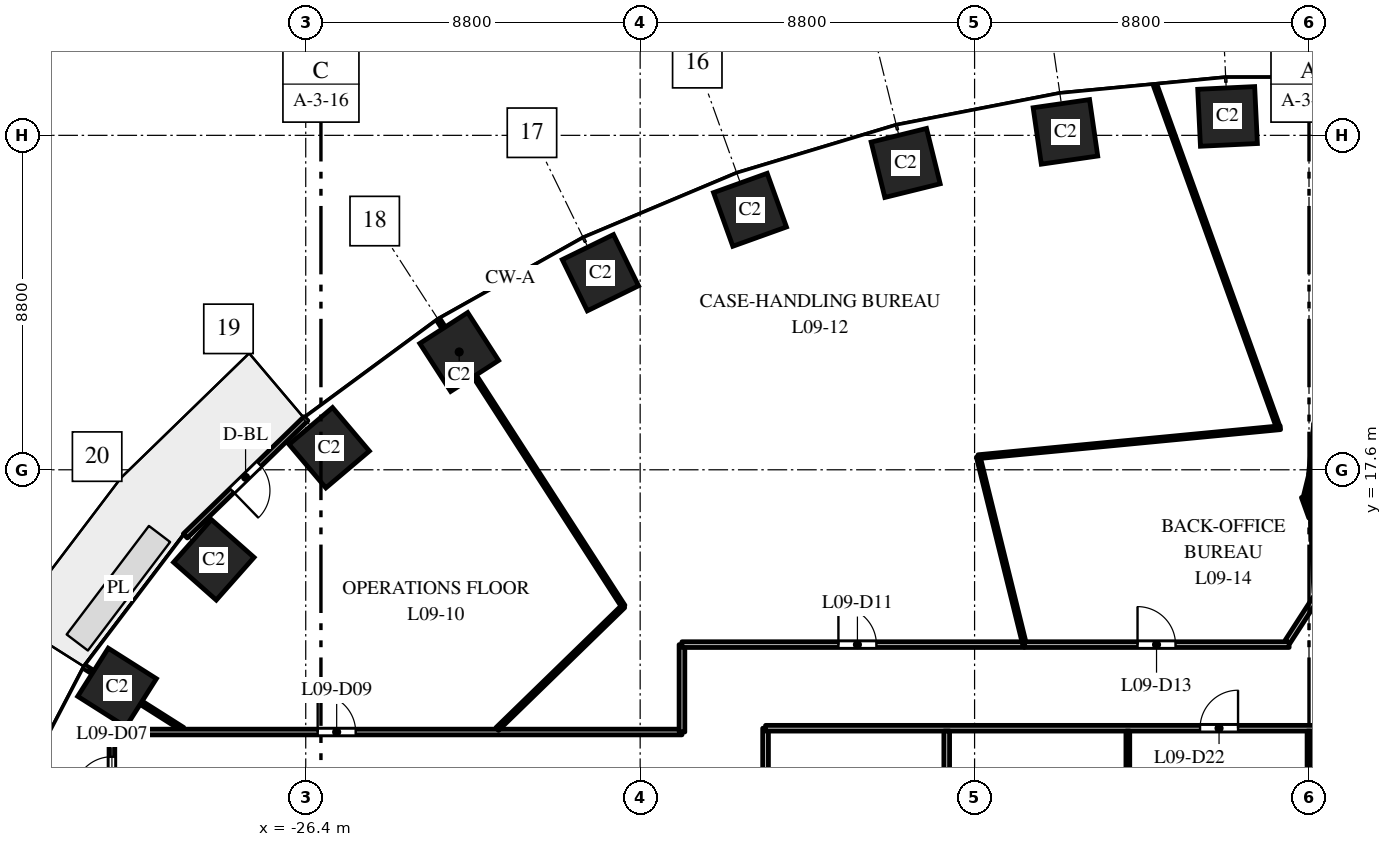
"""IFC4 building model, lengths in metres.
Left out: names, types, materials, properties, quantities, classifications, styles, units other than length and angle.
Written with IfcOpenShell. Run it as: python <this file> out.ifc"""

import sys

from ifc_helpers import new_model, si_unit, direction, frame, frame_2d, origin, origin_2d, place, context, subcontext, project, spatial, rectangle, extrude, element, fill, save


model = new_model("IFC4")
c1 = context("Model", 3, precision=1e-05, world=origin(), true_north=direction((0.0, 1.0)))
c2 = subcontext(c1, "Body", "Model", "MODEL_VIEW")
j1 = project(units=[si_unit("LENGTHUNIT", "METRE"), si_unit("PLANEANGLEUNIT", "RADIAN")], contexts=[c1])
p1 = place(None, origin())
s1 = spatial("IfcSite", under=j1, at=p1, CompositionType="ELEMENT")
p2 = place(p1, origin())
s2 = spatial("IfcBuilding", under=s1, at=p2, CompositionType="ELEMENT")
p3 = place(p2, frame((0.0, 0.0, 46.5)))
s3 = spatial("IfcBuildingStorey", under=s2, at=p3, CompositionType="ELEMENT", Elevation=46.5)
for number, where, z_axis, x_axis in (
    (1, (-2.143, 26.898, 0.0), (0.0, 0.0, 1.0), (-0.999, -0.048, 0.0)),
    (2, (-6.409, 26.491, 0.0), (0.0, 0.0, 1.0), (-0.99, -0.143, 0.0)),
    (3, (-10.613, 25.674, 0.0), (0.0, 0.0, 1.0), (-0.971, -0.24, 0.0)),
    (4, (-14.709, 24.441, 0.0), (0.0, 0.0, 1.0), (-0.941, -0.338, 0.0)),
    (5, (-18.646, 22.785, 0.0), (0.0, 0.0, 1.0), (-0.898, -0.439, 0.0)),
    (6, (-22.362, 20.7, 0.0), (0.0, 0.0, 1.0), (-0.84, -0.542, 0.0)),
    (7, (-25.783, 18.18, 0.0), (0.0, 0.0, 1.0), (-0.763, -0.646, 0.0)),
    (8, (-28.819, 15.23, 0.0), (0.0, 0.0, 1.0), (-0.663, -0.749, 0.0)),
    (9, (-31.365, 11.871, 0.0), (0.0, 0.0, 1.0), (-0.535, -0.845, 0.0)),
):
    element("IfcColumn", number, at=place(p3, frame(where, z_axis=z_axis, x_axis=x_axis)), inside=s3, PredefinedType="COLUMN", context=c2, shape_type="SweptSolid", body=[
        extrude(rectangle(XDim=1.5, YDim=1.5, at=origin_2d()), origin(), (0.0, 0.0, 1.0), 4.0),
    ])
p4 = place(p3, frame((-26.396, 18.943, 0.0), z_axis=(0.0, 0.0, 1.0), x_axis=(-0.717214761864, -0.696852197647, 0.0)))
e10 = element("IfcWall", 10, at=p4, inside=s3, PredefinedType="STANDARD", context=c2, shape_type="SweptSolid", body=[
    extrude(rectangle(XDim=4.424, YDim=0.15, at=frame_2d((2.212, 0.0))), origin(), (0.0, 0.0, 1.0), 3.7),
])
p5 = place(p4, frame((1.712, 0.0, 0.0)))
e11 = element("IfcOpeningElement", 11, at=p5, cuts=e10, PredefinedType="OPENING", context=c2, shape_type="SweptSolid", body=[
    extrude(rectangle(XDim=1.0, YDim=2.4, at=frame_2d((0.5, 1.2))), frame((0.0, 0.085, 0.0), z_axis=(0.0, -1.0, 0.0), x_axis=(1.0, 0.0, 0.0)), (0.0, 0.0, 1.0), 0.17),
])
p6 = place(p3, frame((-32.212, 12.408, 0.0), z_axis=(0.0, 0.0, 1.0), x_axis=(0.844810627195, -0.535065420467, 0.0)))
e12 = element("IfcWall", 12, at=p6, inside=s3, PredefinedType="PARTITIONING", context=c2, shape_type="SweptSolid", body=[
    extrude(rectangle(XDim=3.048, YDim=0.1, at=frame_2d((1.524, 0.0))), origin(), (0.0, 0.0, 1.0), 3.7),
])
p7 = place(p3, frame((-31.5, 8.5, 0.0), z_axis=(0.0, 0.0, 1.0), x_axis=(0.0, 1.0, 0.0)))
e13 = element("IfcWall", 13, at=p7, inside=s3, PredefinedType="PARTITIONING", context=c2, shape_type="SweptSolid", body=[
    extrude(rectangle(XDim=2.2, YDim=0.15, at=frame_2d((1.1, 0.0))), origin(), (0.0, 0.0, 1.0), 3.7),
])
p8 = place(p7, frame((0.55, 0.0, 0.0)))
e14 = element("IfcOpeningElement", 14, at=p8, cuts=e13, PredefinedType="OPENING", context=c2, shape_type="SweptSolid", body=[
    extrude(rectangle(XDim=1.0, YDim=2.1, at=frame_2d((0.5, 1.05))), frame((0.0, 0.085, 0.0), z_axis=(0.0, -1.0, 0.0), x_axis=(1.0, 0.0, 0.0)), (0.0, 0.0, 1.0), 0.17),
])
p9 = place(p3, frame((-31.5, 10.7, 0.0), z_axis=(0.0, 0.0, 1.0), x_axis=(1.0, 0.0, 0.0)))
e15 = element("IfcWall", 15, at=p9, inside=s3, PredefinedType="PARTITIONING", context=c2, shape_type="SweptSolid", body=[
    extrude(rectangle(XDim=15.0, YDim=0.15, at=frame_2d((7.5, 0.0))), origin(), (0.0, 0.0, 1.0), 3.1),
])
p10 = place(p9, frame((5.414, 0.0, 0.0)))
e16 = element("IfcOpeningElement", 16, at=p10, cuts=e15, PredefinedType="OPENING", context=c2, shape_type="SweptSolid", body=[
    extrude(rectangle(XDim=1.0, YDim=2.1, at=frame_2d((0.5, 1.05))), frame((0.0, 0.085, 0.0), z_axis=(0.0, -1.0, 0.0), x_axis=(1.0, 0.0, 0.0)), (0.0, 0.0, 1.0), 0.17),
])
p11 = place(p3, frame((-22.905, 21.542, 0.0), z_axis=(0.0, 0.0, 1.0), x_axis=(0.542241597628, -0.840222619192, 0.0)))
e17 = element("IfcWall", 17, at=p11, inside=s3, PredefinedType="PARTITIONING", context=c2, shape_type="SweptSolid", body=[
    extrude(rectangle(XDim=8.967, YDim=0.1, at=frame_2d((4.483, 0.0))), origin(), (0.0, 0.0, 1.0), 2.85),
])
p12 = place(p3, frame((-21.362, 10.778, 0.0), z_axis=(0.0, 0.0, 1.0), x_axis=(0.716869759063, 0.697207105917, 0.0)))
e18 = element("IfcWall", 18, at=p12, inside=s3, PredefinedType="PARTITIONING", context=c2, shape_type="SweptSolid", body=[
    extrude(rectangle(XDim=4.631, YDim=0.1, at=frame_2d((2.316, 0.0))), origin(), (0.0, 0.0, 1.0), 2.75),
])
p13 = place(p3, frame((-16.5, 10.7, 0.0), z_axis=(0.0, 0.0, 1.0), x_axis=(0.0, 1.0, 0.0)))
e19 = element("IfcWall", 19, at=p13, inside=s3, PredefinedType="PARTITIONING", context=c2, shape_type="SweptSolid", body=[
    extrude(rectangle(XDim=2.3, YDim=0.15, at=frame_2d((1.15, 0.0))), origin(), (0.0, 0.0, 1.0), 2.75),
])
p14 = place(p3, frame((-16.5, 13.0, 0.0), z_axis=(0.0, 0.0, 1.0), x_axis=(1.0, 0.0, 0.0)))
e20 = element("IfcWall", 20, at=p14, inside=s3, PredefinedType="PARTITIONING", context=c2, shape_type="SweptSolid", body=[
    extrude(rectangle(XDim=9.001, YDim=0.15, at=frame_2d((4.5, 0.0))), origin(), (0.0, 0.0, 1.0), 2.85),
])
p15 = place(p14, frame((4.117, 0.0, 0.0)))
e21 = element("IfcOpeningElement", 21, at=p15, cuts=e20, PredefinedType="OPENING", context=c2, shape_type="SweptSolid", body=[
    extrude(rectangle(XDim=1.0, YDim=2.1, at=frame_2d((0.5, 1.05))), frame((0.0, 0.085, 0.0), z_axis=(0.0, -1.0, 0.0), x_axis=(1.0, 0.0, 0.0)), (0.0, 0.0, 1.0), 0.17),
])
p16 = place(p3, frame((-14.3, -10.8, 0.0), z_axis=(0.0, 0.0, 1.0), x_axis=(0.0, 1.0, 0.0)))
e22 = element("IfcWall", 22, at=p16, inside=s3, PredefinedType="PARTITIONING", context=c2, shape_type="SweptSolid", body=[
    extrude(rectangle(XDim=21.6, YDim=0.15, at=frame_2d((10.8, 0.0))), origin(), (0.0, 0.0, 1.0), 2.75),
])
p17 = place(p16, frame((10.4, 0.0, 0.0)))
e23 = element("IfcOpeningElement", 23, at=p17, cuts=e22, PredefinedType="OPENING", context=c2, shape_type="SweptSolid", body=[
    extrude(rectangle(XDim=1.0, YDim=2.1, at=frame_2d((0.5, 1.05))), frame((0.0, 0.085, 0.0), z_axis=(0.0, -1.0, 0.0), x_axis=(1.0, 0.0, 0.0)), (0.0, 0.0, 1.0), 0.17),
])
p18 = place(p3, frame((-14.3, 10.8, 0.0), z_axis=(0.0, 0.0, 1.0), x_axis=(1.0, 0.0, 0.0)))
e24 = element("IfcWall", 24, at=p18, inside=s3, PredefinedType="PARTITIONING", context=c2, shape_type="SweptSolid", body=[
    extrude(rectangle(XDim=28.6, YDim=0.15, at=frame_2d((14.3, 0.0))), origin(), (0.0, 0.0, 1.0), 2.85),
])
p19 = place(p18, frame((11.433, 0.0, 0.0)))
e25 = element("IfcOpeningElement", 25, at=p19, cuts=e24, PredefinedType="OPENING", context=c2, shape_type="SweptSolid", body=[
    extrude(rectangle(XDim=1.0, YDim=2.1, at=frame_2d((0.5, 1.05))), frame((0.0, 0.085, 0.0), z_axis=(0.0, -1.0, 0.0), x_axis=(1.0, 0.0, 0.0)), (0.0, 0.0, 1.0), 0.17),
])
p20 = place(p18, frame((16.2, 0.0, 0.0)))
e26 = element("IfcOpeningElement", 26, at=p20, cuts=e24, PredefinedType="OPENING", context=c2, shape_type="SweptSolid", body=[
    extrude(rectangle(XDim=1.0, YDim=2.1, at=frame_2d((0.5, 1.05))), frame((0.0, 0.085, 0.0), z_axis=(0.0, -1.0, 0.0), x_axis=(1.0, 0.0, 0.0)), (0.0, 0.0, 1.0), 0.17),
])
p21 = place(p18, frame((20.967, 0.0, 0.0)))
e27 = element("IfcOpeningElement", 27, at=p21, cuts=e24, PredefinedType="OPENING", context=c2, shape_type="SweptSolid", body=[
    extrude(rectangle(XDim=1.0, YDim=2.1, at=frame_2d((0.5, 1.05))), frame((0.0, 0.085, 0.0), z_axis=(0.0, -1.0, 0.0), x_axis=(1.0, 0.0, 0.0)), (0.0, 0.0, 1.0), 0.17),
])
p22 = place(p3, frame((-9.533, -10.725, 0.0), z_axis=(0.0, 0.0, 1.0), x_axis=(0.0, 1.0, 0.0)))
e28 = element("IfcWall", 28, at=p22, inside=s3, PredefinedType="PARTITIONING", context=c2, shape_type="SweptSolid", body=[
    extrude(rectangle(XDim=21.45, YDim=0.15, at=frame_2d((10.725, 0.0))), origin(), (0.0, 0.0, 1.0), 2.75),
])
p23 = place(p22, frame((15.575, 0.0, 0.0)))
e29 = element("IfcOpeningElement", 29, at=p23, cuts=e28, PredefinedType="OPENING", context=c2, shape_type="SweptSolid", body=[
    extrude(rectangle(XDim=1.0, YDim=2.1, at=frame_2d((0.5, 1.05))), frame((0.0, 0.085, 0.0), z_axis=(0.0, -1.0, 0.0), x_axis=(1.0, 0.0, 0.0)), (0.0, 0.0, 1.0), 0.17),
])
p24 = place(p3, frame((-8.704, 17.945, 0.0), z_axis=(0.0, 0.0, 1.0), x_axis=(0.995439666097, 0.095393244838, 0.0)))
e30 = element("IfcWall", 30, at=p24, inside=s3, PredefinedType="PARTITIONING", context=c2, shape_type="SweptSolid", body=[
    extrude(rectangle(XDim=7.988, YDim=0.1, at=frame_2d((3.994, 0.0))), origin(), (0.0, 0.0, 1.0), 2.85),
])
p25 = place(p3, frame((-8.704, 17.946, 0.0), z_axis=(0.0, 0.0, 1.0), x_axis=(0.239704393154, -0.970845921814, 0.0)))
e31 = element("IfcWall", 31, at=p25, inside=s3, PredefinedType="PARTITIONING", context=c2, shape_type="SweptSolid", body=[
    extrude(rectangle(XDim=5.094, YDim=0.1, at=frame_2d((2.547, 0.0))), origin(), (0.0, 0.0, 1.0), 3.7),
])
p26 = place(p3, frame((-7.483, 13.0, 0.0), z_axis=(0.0, 0.0, 1.0), x_axis=(1.0, 0.0, 0.0)))
e32 = element("IfcWall", 32, at=p26, inside=s3, PredefinedType="PARTITIONING", context=c2, shape_type="SweptSolid", body=[
    extrude(rectangle(XDim=6.96, YDim=0.15, at=frame_2d((3.48, 0.0))), origin(), (0.0, 0.0, 1.0), 2.85),
])
p27 = place(p26, frame((2.971, 0.0, 0.0)))
e33 = element("IfcOpeningElement", 33, at=p27, cuts=e32, PredefinedType="OPENING", context=c2, shape_type="SweptSolid", body=[
    extrude(rectangle(XDim=1.0, YDim=2.1, at=frame_2d((0.5, 1.05))), frame((0.0, 0.085, 0.0), z_axis=(0.0, -1.0, 0.0), x_axis=(1.0, 0.0, 0.0)), (0.0, 0.0, 1.0), 0.17),
])
p28 = place(p3, frame((-4.767, 6.363, 0.0), z_axis=(0.0, 0.0, 1.0), x_axis=(0.0, 1.0, 0.0)))
e34 = element("IfcWall", 34, at=p28, inside=s3, PredefinedType="PARTITIONING", context=c2, shape_type="SweptSolid", body=[
    extrude(rectangle(XDim=4.362, YDim=0.1, at=frame_2d((2.181, 0.0))), origin(), (0.0, 0.0, 1.0), 2.85),
])
p29 = place(p3, frame((-4.046, 27.717, 0.0), z_axis=(0.0, 0.0, 1.0), x_axis=(0.338447260677, -0.940985362129, 0.0)))
e35 = element("IfcWall", 35, at=p29, inside=s3, PredefinedType="PARTITIONING", context=c2, shape_type="SweptSolid", body=[
    extrude(rectangle(XDim=9.528, YDim=0.1, at=frame_2d((4.764, 0.0))), origin(), (0.0, 0.0, 1.0), 2.85),
])
p30 = place(p3, frame((-0.564, 13.075, 0.0), z_axis=(0.0, 0.0, 1.0), x_axis=(0.542961200627, 0.839757783301, 0.0)))
e36 = element("IfcWall", 36, at=p30, inside=s3, PredefinedType="PARTITIONING", context=c2, shape_type="SweptSolid", body=[
    extrude(rectangle(XDim=1.466, YDim=0.15, at=frame_2d((0.733, 0.0))), origin(), (0.0, 0.0, 1.0), 3.7),
])
p31 = place(p3, frame((-0.152, 16.888, 0.0), z_axis=(0.0, 0.0, 1.0), x_axis=(0.339185428329, -0.940719535892, 0.0)))
e37 = element("IfcWall", 37, at=p31, inside=s3, PredefinedType="PARTITIONING", context=c2, shape_type="SweptSolid", body=[
    extrude(rectangle(XDim=0.575, YDim=0.1, at=frame_2d((0.288, 0.0))), origin(), (0.0, 0.0, 1.0), 3.7),
])
p32 = place(p3, frame((-0.099, 16.892, 0.0), z_axis=(0.0, 0.0, 1.0), x_axis=(0.239223165208, 0.970964611728, 0.0)))
e38 = element("IfcWall", 38, at=p32, inside=s3, PredefinedType="PARTITIONING", context=c2, shape_type="SweptSolid", body=[
    extrude(rectangle(XDim=0.694, YDim=0.1, at=frame_2d((0.347, 0.0))), origin(), (0.0, 0.0, 1.0), 3.7),
])
p33 = place(p3, frame((0.0, 7.504, 0.0), z_axis=(0.0, 0.0, 1.0), x_axis=(0.0, 1.0, 0.0)))
e39 = element("IfcWall", 39, at=p33, inside=s3, PredefinedType="PARTITIONING", context=c2, shape_type="SweptSolid", body=[
    extrude(rectangle(XDim=3.221, YDim=0.1, at=frame_2d((1.611, 0.0))), origin(), (0.0, 0.0, 1.0), 3.7),
])
p34 = place(p3, frame((0.04, 17.284, 0.0), z_axis=(0.0, 0.0, 1.0), x_axis=(0.047505648741, -0.998870969314, 0.0)))
e40 = element("IfcWall", 40, at=p34, inside=s3, PredefinedType="PARTITIONING", context=c2, shape_type="SweptSolid", body=[
    extrude(rectangle(XDim=2.924, YDim=0.1, at=frame_2d((1.462, 0.0))), origin(), (0.0, 0.0, 1.0), 3.7),
])
p35 = place(p3, frame((0.038, 17.474, 0.0), z_axis=(0.0, 0.0, 1.0), x_axis=(0.100886401076, 0.99489795159, 0.0)))
e41 = element("IfcWall", 41, at=p35, inside=s3, PredefinedType="PARTITIONING", context=c2, shape_type="SweptSolid", body=[
    extrude(rectangle(XDim=1.329, YDim=0.1, at=frame_2d((0.664, 0.0))), origin(), (0.0, 0.0, 1.0), 3.7),
])
p36 = place(p5, origin())
e42 = element("IfcDoor", 42, at=p36, inside=s3, OperationType="SINGLE_SWING_RIGHT", PredefinedType="DOOR", context=c2, shape_type="SweptSolid", body=[
    extrude(rectangle(XDim=1.0, YDim=2.4, at=frame_2d((0.5, 1.2))), frame((0.0, 0.025, 0.0), z_axis=(0.0, -1.0, 0.0), x_axis=(1.0, 0.0, 0.0)), (0.0, 0.0, 1.0), 0.05),
])
fill(e11, e42)
p37 = place(p8, origin())
e43 = element("IfcDoor", 43, at=p37, inside=s3, OperationType="SINGLE_SWING_LEFT", PredefinedType="DOOR", context=c2, shape_type="SweptSolid", body=[
    extrude(rectangle(XDim=1.0, YDim=2.1, at=frame_2d((0.5, 1.05))), frame((0.0, 0.025, 0.0), z_axis=(0.0, -1.0, 0.0), x_axis=(1.0, 0.0, 0.0)), (0.0, 0.0, 1.0), 0.05),
])
fill(e14, e43)
p38 = place(p10, origin())
e44 = element("IfcDoor", 44, at=p38, inside=s3, OperationType="SINGLE_SWING_LEFT", PredefinedType="DOOR", context=c2, shape_type="SweptSolid", body=[
    extrude(rectangle(XDim=1.0, YDim=2.1, at=frame_2d((0.5, 1.05))), frame((0.0, 0.025, 0.0), z_axis=(0.0, -1.0, 0.0), x_axis=(1.0, 0.0, 0.0)), (0.0, 0.0, 1.0), 0.05),
])
fill(e16, e44)
p39 = place(p15, origin())
e45 = element("IfcDoor", 45, at=p39, inside=s3, OperationType="SINGLE_SWING_LEFT", PredefinedType="DOOR", context=c2, shape_type="SweptSolid", body=[
    extrude(rectangle(XDim=1.0, YDim=2.1, at=frame_2d((0.5, 1.05))), frame((0.0, 0.025, 0.0), z_axis=(0.0, -1.0, 0.0), x_axis=(1.0, 0.0, 0.0)), (0.0, 0.0, 1.0), 0.05),
])
fill(e21, e45)
p40 = place(p27, origin())
e46 = element("IfcDoor", 46, at=p40, inside=s3, OperationType="SINGLE_SWING_LEFT", PredefinedType="DOOR", context=c2, shape_type="SweptSolid", body=[
    extrude(rectangle(XDim=1.0, YDim=2.1, at=frame_2d((0.5, 1.05))), frame((0.0, 0.025, 0.0), z_axis=(0.0, -1.0, 0.0), x_axis=(1.0, 0.0, 0.0)), (0.0, 0.0, 1.0), 0.05),
])
fill(e33, e46)
p41 = place(p19, origin())
e47 = element("IfcDoor", 47, at=p41, inside=s3, OperationType="SINGLE_SWING_RIGHT", PredefinedType="DOOR", context=c2, shape_type="SweptSolid", body=[
    extrude(rectangle(XDim=1.0, YDim=2.1, at=frame_2d((0.5, 1.05))), frame((0.0, 0.025, 0.0), z_axis=(0.0, -1.0, 0.0), x_axis=(1.0, 0.0, 0.0)), (0.0, 0.0, 1.0), 0.05),
])
fill(e25, e47)
save(model, sys.argv[1])
